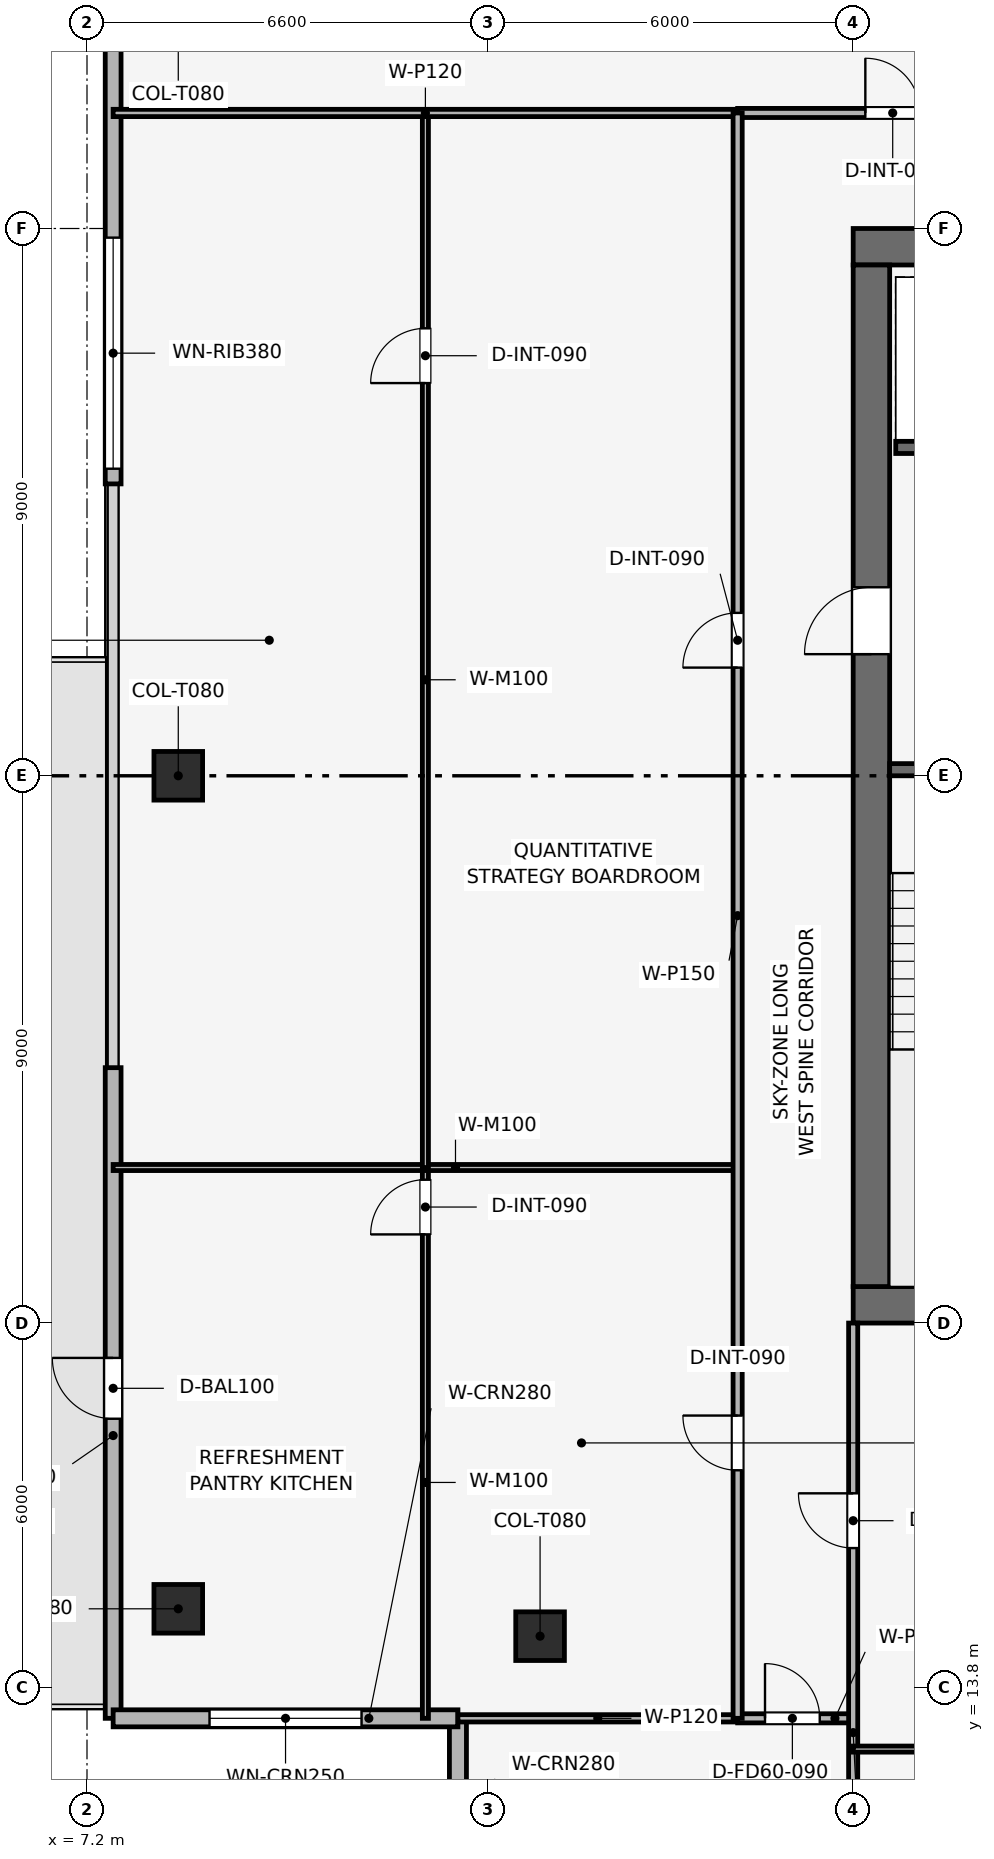
"""IFC4 building model, lengths in metres.
Left out: names, types, materials, properties, quantities, classifications, styles, units other than length and angle.
Written with IfcOpenShell. Run it as: python <this file> out.ifc"""

import sys

from ifc_helpers import new_model, si_unit, direction, frame, frame_2d, origin, origin_2d, place, context, subcontext, project, spatial, rectangle, extrude, element, fill, save


model = new_model("IFC4")
c1 = context("Model", 3, precision=1e-05, world=origin(), true_north=direction((0.0, 1.0)))
c2 = subcontext(c1, "Body", "Model", "MODEL_VIEW")
j1 = project(units=[si_unit("LENGTHUNIT", "METRE"), si_unit("PLANEANGLEUNIT", "RADIAN")], contexts=[c1])
p1 = place(None, origin())
s1 = spatial("IfcSite", under=j1, at=p1, CompositionType="ELEMENT")
p2 = place(p1, origin())
s2 = spatial("IfcBuilding", under=s1, at=p2, CompositionType="ELEMENT")
p3 = place(p2, frame((0.0, 0.0, 351.75)))
s3 = spatial("IfcBuildingStorey", under=s2, at=p3, CompositionType="ELEMENT", Elevation=351.75)
p4 = place(p3, frame((19.8, 20.1, 0.0), z_axis=(0.0, 0.0, 1.0), x_axis=(1.0, 0.0, 0.0)))
e1 = element("IfcWall", 1, at=p4, inside=s3, PredefinedType="SHEAR", context=c2, shape_type="SweptSolid", body=[
    extrude(rectangle(XDim=18.0, YDim=0.6, at=frame_2d((9.0, 0.0))), origin(), (0.0, 0.0, 1.0), 3.75),
])
p5 = place(p3, frame((19.8, 37.5, 0.0), z_axis=(0.0, 0.0, 1.0), x_axis=(1.0, 0.0, 0.0)))
e2 = element("IfcWall", 2, at=p5, inside=s3, PredefinedType="SHEAR", context=c2, shape_type="SweptSolid", body=[
    extrude(rectangle(XDim=18.0, YDim=0.6, at=frame_2d((9.0, 0.0))), origin(), (0.0, 0.0, 1.0), 3.75),
])
p6 = place(p5, frame((7.05, 0.0, 0.0)))
e3 = element("IfcOpeningElement", 3, at=p6, cuts=e2, PredefinedType="OPENING", context=c2, shape_type="SweptSolid", body=[
    extrude(rectangle(XDim=1.1, YDim=2.15, at=frame_2d((0.55, 1.075))), frame((0.0, 0.31, 0.0), z_axis=(0.0, -1.0, 0.0), x_axis=(1.0, 0.0, 0.0)), (0.0, 0.0, 1.0), 0.62),
])
p7 = place(p3, frame((20.1, 20.4, 0.0), z_axis=(0.0, 0.0, 1.0), x_axis=(0.0, 1.0, 0.0)))
e4 = element("IfcWall", 4, at=p7, inside=s3, PredefinedType="SHEAR", context=c2, shape_type="SweptSolid", body=[
    extrude(rectangle(XDim=16.8, YDim=0.6, at=frame_2d((8.4, 0.0))), origin(), (0.0, 0.0, 1.0), 3.75),
])
p8 = place(p7, frame((10.4, 0.0, 0.0)))
e5 = element("IfcOpeningElement", 5, at=p8, cuts=e4, PredefinedType="OPENING", context=c2, shape_type="SweptSolid", body=[
    extrude(rectangle(XDim=1.1, YDim=2.15, at=frame_2d((0.55, 1.075))), frame((0.0, 0.31, 0.0), z_axis=(0.0, -1.0, 0.0), x_axis=(1.0, 0.0, 0.0)), (0.0, 0.0, 1.0), 0.62),
])
p9 = place(p3, frame((8.701, 28.8, 0.003), z_axis=(0.233370375419, 0.0, 0.97238792047), x_axis=(0.0, 1.0, 0.0)))
e6 = element("IfcColumn", 6, at=p9, inside=s3, PredefinedType="COLUMN", context=c2, shape_type="SweptSolid", body=[
    extrude(rectangle(XDim=0.8, YDim=0.8, at=origin_2d()), origin(), (0.0, 0.0, 1.0), 3.583),
])
p10 = place(p3, frame((8.701, 15.101, 0.003), z_axis=(0.229623714174, 0.178469584564, 0.956776649629), x_axis=(-0.613669261878, 0.789563193814, 0.0)))
e7 = element("IfcColumn", 7, at=p10, inside=s3, PredefinedType="COLUMN", context=c2, shape_type="SweptSolid", body=[
    extrude(rectangle(XDim=0.8, YDim=0.8, at=origin_2d()), origin(), (0.0, 0.0, 1.0), 3.642),
])
p11 = place(p3, frame((14.651, 14.651, 0.003), z_axis=(0.180425446151, 0.180425446151, 0.966898814128), x_axis=(-0.707106781187, 0.707106781187, 0.0)))
e8 = element("IfcColumn", 8, at=p11, inside=s3, PredefinedType="COLUMN", context=c2, shape_type="SweptSolid", body=[
    extrude(rectangle(XDim=0.8, YDim=0.8, at=origin_2d()), origin(), (0.0, 0.0, 1.0), 3.604),
])
p12 = place(p3, frame((7.63, 13.3, 0.0), z_axis=(0.0, 0.0, 1.0), x_axis=(0.0, 1.0, 0.0)))
e9 = element("IfcWall", 9, at=p12, inside=s3, PredefinedType="SOLIDWALL", context=c2, shape_type="SweptSolid", body=[
    extrude(rectangle(XDim=10.7, YDim=0.26, at=frame_2d((5.35, 0.0))), origin(), (0.0, 0.0, 1.0), 3.49),
])
p13 = place(p12, frame((4.927, 0.0, 0.0)))
e10 = element("IfcOpeningElement", 10, at=p13, cuts=e9, PredefinedType="OPENING", context=c2, shape_type="SweptSolid", body=[
    extrude(rectangle(XDim=1.0, YDim=2.2, at=frame_2d((0.5, 1.1))), frame((0.0, 0.14, 0.0), z_axis=(0.0, -1.0, 0.0), x_axis=(1.0, 0.0, 0.0)), (0.0, 0.0, 1.0), 0.28),
])
p14 = place(p3, frame((7.63, 33.6, 0.0), z_axis=(0.0, 0.0, 1.0), x_axis=(0.0, 1.0, 0.0)))
e11 = element("IfcWall", 11, at=p14, inside=s3, PredefinedType="SOLIDWALL", context=c2, shape_type="SweptSolid", body=[
    extrude(rectangle(XDim=10.7, YDim=0.26, at=frame_2d((5.35, 0.0))), origin(), (0.0, 0.0, 1.0), 3.49),
])
p15 = place(p14, frame((0.25, 0.0, 0.9)))
e12 = element("IfcOpeningElement", 12, at=p15, cuts=e11, PredefinedType="OPENING", context=c2, shape_type="SweptSolid", body=[
    extrude(rectangle(XDim=3.8, YDim=1.9, at=frame_2d((1.9, 0.95))), frame((0.0, 0.14, 0.0), z_axis=(0.0, -1.0, 0.0), x_axis=(1.0, 0.0, 0.0)), (0.0, 0.0, 1.0), 0.28),
])
p16 = place(p3, frame((13.3, 7.63, 0.0), z_axis=(0.0, 0.0, 1.0), x_axis=(0.0, 1.0, 0.0)))
e13 = element("IfcWall", 13, at=p16, inside=s3, PredefinedType="SOLIDWALL", context=c2, shape_type="SweptSolid", body=[
    extrude(rectangle(XDim=5.67, YDim=0.28, at=frame_2d((2.835, 0.0))), origin(), (0.0, 0.0, 1.0), 3.49),
])
p17 = place(p16, frame((1.585, 0.0, 0.9)))
e14 = element("IfcOpeningElement", 14, at=p17, cuts=e13, PredefinedType="OPENING", context=c2, shape_type="SweptSolid", body=[
    extrude(rectangle(XDim=2.5, YDim=1.9, at=frame_2d((1.25, 0.95))), frame((0.0, 0.15, 0.0), z_axis=(0.0, -1.0, 0.0), x_axis=(1.0, 0.0, 0.0)), (0.0, 0.0, 1.0), 0.3),
])
p18 = place(p3, frame((13.3, 13.3, 0.0), z_axis=(0.0, 0.0, 1.0), x_axis=(-1.0, 0.0, 0.0)))
e15 = element("IfcWall", 15, at=p18, inside=s3, PredefinedType="SOLIDWALL", context=c2, shape_type="SweptSolid", body=[
    extrude(rectangle(XDim=5.67, YDim=0.28, at=frame_2d((2.835, 0.0))), origin(), (0.0, 0.0, 1.0), 3.49),
])
p19 = place(p18, frame((1.585, 0.0, 0.9)))
e16 = element("IfcOpeningElement", 16, at=p19, cuts=e15, PredefinedType="OPENING", context=c2, shape_type="SweptSolid", body=[
    extrude(rectangle(XDim=2.5, YDim=1.9, at=frame_2d((1.25, 0.95))), frame((0.0, 0.15, 0.0), z_axis=(0.0, -1.0, 0.0), x_axis=(1.0, 0.0, 0.0)), (0.0, 0.0, 1.0), 0.3),
])
p20 = place(p3, frame((20.4, 28.9, 0.0), z_axis=(0.0, 0.0, 1.0), x_axis=(1.0, 0.0, 0.0)))
e17 = element("IfcWall", 17, at=p20, inside=s3, PredefinedType="SHEAR", context=c2, shape_type="SweptSolid", body=[
    extrude(rectangle(XDim=3.15, YDim=0.2, at=frame_2d((1.575, 0.0))), origin(), (0.0, 0.0, 1.0), 3.49),
])
p21 = place(p20, frame((0.8, 0.0, 0.0)))
e18 = element("IfcOpeningElement", 18, at=p21, cuts=e17, PredefinedType="OPENING", context=c2, shape_type="SweptSolid", body=[
    extrude(rectangle(XDim=1.0, YDim=2.1, at=frame_2d((0.5, 1.05))), frame((0.0, 0.11, 0.0), z_axis=(0.0, -1.0, 0.0), x_axis=(1.0, 0.0, 0.0)), (0.0, 0.0, 1.0), 0.22),
])
p22 = place(p3, frame((20.5, 34.2, 0.0), z_axis=(0.0, 0.0, 1.0), x_axis=(1.0, 0.0, 0.0)))
e19 = element("IfcWall", 19, at=p22, inside=s3, PredefinedType="SHEAR", context=c2, shape_type="SweptSolid", body=[
    extrude(rectangle(XDim=3.05, YDim=0.2, at=frame_2d((1.525, 0.0))), origin(), (0.0, 0.0, 1.0), 3.49),
])
p23 = place(p22, frame((0.75, 0.0, 0.0)))
e20 = element("IfcOpeningElement", 20, at=p23, cuts=e19, PredefinedType="OPENING", context=c2, shape_type="SweptSolid", body=[
    extrude(rectangle(XDim=1.1, YDim=2.15, at=frame_2d((0.55, 1.075))), frame((0.0, 0.11, 0.0), z_axis=(0.0, -1.0, 0.0), x_axis=(1.0, 0.0, 0.0)), (0.0, 0.0, 1.0), 0.22),
])
p24 = place(p3, frame((12.765, 13.3, 0.0), z_axis=(0.0, 0.0, 1.0), x_axis=(0.0, 1.0, 0.0)))
e21 = element("IfcWall", 21, at=p24, inside=s3, PredefinedType="MOVABLE", context=c2, shape_type="SweptSolid", body=[
    extrude(rectangle(XDim=9.058, YDim=0.1, at=frame_2d((4.529, 0.0))), origin(), (0.0, 0.0, 1.0), 3.075),
])
p25 = place(p24, frame((7.958, 0.0, 0.0)))
e22 = element("IfcOpeningElement", 22, at=p25, cuts=e21, PredefinedType="OPENING", context=c2, shape_type="SweptSolid", body=[
    extrude(rectangle(XDim=0.9, YDim=2.1, at=frame_2d((0.45, 1.05))), frame((0.0, 0.06, 0.0), z_axis=(0.0, -1.0, 0.0), x_axis=(1.0, 0.0, 0.0)), (0.0, 0.0, 1.0), 0.12),
])
p26 = place(p3, frame((7.63, 22.358, 0.0), z_axis=(0.0, 0.0, 1.0), x_axis=(1.0, 0.0, 0.0)))
e23 = element("IfcWall", 23, at=p26, inside=s3, PredefinedType="MOVABLE", context=c2, shape_type="SweptSolid", body=[
    extrude(rectangle(XDim=10.27, YDim=0.1, at=frame_2d((5.135, 0.0))), origin(), (0.0, 0.0, 1.0), 3.115),
])
p27 = place(p3, frame((12.765, 22.358, 0.0), z_axis=(0.0, 0.0, 1.0), x_axis=(0.0, 1.0, 0.0)))
e24 = element("IfcWall", 24, at=p27, inside=s3, PredefinedType="MOVABLE", context=c2, shape_type="SweptSolid", body=[
    extrude(rectangle(XDim=17.342, YDim=0.1, at=frame_2d((8.671, 0.0))), origin(), (0.0, 0.0, 1.0), 3.075),
])
p28 = place(p27, frame((12.9, 0.0, 0.0)))
e25 = element("IfcOpeningElement", 25, at=p28, cuts=e24, PredefinedType="OPENING", context=c2, shape_type="SweptSolid", body=[
    extrude(rectangle(XDim=0.9, YDim=2.1, at=frame_2d((0.45, 1.05))), frame((0.0, 0.06, 0.0), z_axis=(0.0, -1.0, 0.0), x_axis=(1.0, 0.0, 0.0)), (0.0, 0.0, 1.0), 0.12),
])
p29 = place(p3, frame((13.3, 13.3, 0.0), z_axis=(0.0, 0.0, 1.0), x_axis=(1.0, 0.0, 0.0)))
e26 = element("IfcWall", 26, at=p29, inside=s3, PredefinedType="PARTITIONING", context=c2, shape_type="SweptSolid", body=[
    extrude(rectangle(XDim=4.6, YDim=0.12, at=frame_2d((2.3, 0.0))), origin(), (0.0, 0.0, 1.0), 3.175),
])
p30 = place(p3, frame((17.9, 13.3, 0.0), z_axis=(0.0, 0.0, 1.0), x_axis=(1.0, 0.0, 0.0)))
e27 = element("IfcWall", 27, at=p30, inside=s3, PredefinedType="PARTITIONING", context=c2, shape_type="SweptSolid", body=[
    extrude(rectangle(XDim=1.9, YDim=0.15, at=frame_2d((0.95, 0.0))), origin(), (0.0, 0.0, 1.0), 3.49),
])
p31 = place(p30, frame((0.45, 0.0, 0.0)))
e28 = element("IfcOpeningElement", 28, at=p31, cuts=e27, PredefinedType="OPENING", context=c2, shape_type="SweptSolid", body=[
    extrude(rectangle(XDim=0.9, YDim=2.1, at=frame_2d((0.45, 1.05))), frame((0.0, 0.085, 0.0), z_axis=(0.0, -1.0, 0.0), x_axis=(1.0, 0.0, 0.0)), (0.0, 0.0, 1.0), 0.17),
])
p32 = place(p3, frame((19.8, 7.63, 0.0), z_axis=(0.0, 0.0, 1.0), x_axis=(0.0, 1.0, 0.0)))
e29 = element("IfcWall", 29, at=p32, inside=s3, PredefinedType="PARTITIONING", context=c2, shape_type="SweptSolid", body=[
    extrude(rectangle(XDim=12.17, YDim=0.15, at=frame_2d((6.085, 0.0))), origin(), (0.0, 0.0, 1.0), 3.075),
])
p33 = place(p32, frame((8.47, 0.0, 0.0)))
e30 = element("IfcOpeningElement", 30, at=p33, cuts=e29, PredefinedType="OPENING", context=c2, shape_type="SweptSolid", body=[
    extrude(rectangle(XDim=0.9, YDim=2.1, at=frame_2d((0.45, 1.05))), frame((0.0, 0.085, 0.0), z_axis=(0.0, -1.0, 0.0), x_axis=(1.0, 0.0, 0.0)), (0.0, 0.0, 1.0), 0.17),
])
p34 = place(p3, frame((19.8, 12.794, 0.0), z_axis=(0.0, 0.0, 1.0), x_axis=(1.0, 0.0, 0.0)))
e31 = element("IfcWall", 31, at=p34, inside=s3, PredefinedType="MOVABLE", context=c2, shape_type="SweptSolid", body=[
    extrude(rectangle(XDim=24.5, YDim=0.1, at=frame_2d((12.25, 0.0))), origin(), (0.0, 0.0, 1.0), 3.075),
])
p35 = place(p34, frame((2.133, 0.0, 0.0)))
e32 = element("IfcOpeningElement", 32, at=p35, cuts=e31, PredefinedType="OPENING", context=c2, shape_type="SweptSolid", body=[
    extrude(rectangle(XDim=0.9, YDim=2.1, at=frame_2d((0.45, 1.05))), frame((0.0, 0.06, 0.0), z_axis=(0.0, -1.0, 0.0), x_axis=(1.0, 0.0, 0.0)), (0.0, 0.0, 1.0), 0.12),
])
p36 = place(p3, frame((7.63, 39.7, 0.0), z_axis=(0.0, 0.0, 1.0), x_axis=(1.0, 0.0, 0.0)))
e33 = element("IfcWall", 33, at=p36, inside=s3, PredefinedType="PARTITIONING", context=c2, shape_type="SweptSolid", body=[
    extrude(rectangle(XDim=10.27, YDim=0.12, at=frame_2d((5.135, 0.0))), origin(), (0.0, 0.0, 1.0), 3.075),
])
p37 = place(p3, frame((17.9, 39.7, 0.0), z_axis=(0.0, 0.0, 1.0), x_axis=(1.0, 0.0, 0.0)))
e34 = element("IfcWall", 34, at=p37, inside=s3, PredefinedType="PARTITIONING", context=c2, shape_type="SweptSolid", body=[
    extrude(rectangle(XDim=21.8, YDim=0.15, at=frame_2d((10.9, 0.0))), origin(), (0.0, 0.0, 1.0), 3.075),
])
p38 = place(p37, frame((2.1, 0.0, 0.0)))
e35 = element("IfcOpeningElement", 35, at=p38, cuts=e34, PredefinedType="OPENING", context=c2, shape_type="SweptSolid", body=[
    extrude(rectangle(XDim=0.9, YDim=2.1, at=frame_2d((0.45, 1.05))), frame((0.0, 0.085, 0.0), z_axis=(0.0, -1.0, 0.0), x_axis=(1.0, 0.0, 0.0)), (0.0, 0.0, 1.0), 0.17),
])
p39 = place(p37, frame((6.05, 0.0, 0.0)))
e36 = element("IfcOpeningElement", 36, at=p39, cuts=e34, PredefinedType="OPENING", context=c2, shape_type="SweptSolid", body=[
    extrude(rectangle(XDim=0.9, YDim=2.1, at=frame_2d((0.45, 1.05))), frame((0.0, 0.085, 0.0), z_axis=(0.0, -1.0, 0.0), x_axis=(1.0, 0.0, 0.0)), (0.0, 0.0, 1.0), 0.17),
])
p40 = place(p37, frame((8.95, 0.0, 0.0)))
e37 = element("IfcOpeningElement", 37, at=p40, cuts=e34, PredefinedType="OPENING", context=c2, shape_type="SweptSolid", body=[
    extrude(rectangle(XDim=0.9, YDim=2.1, at=frame_2d((0.45, 1.05))), frame((0.0, 0.085, 0.0), z_axis=(0.0, -1.0, 0.0), x_axis=(1.0, 0.0, 0.0)), (0.0, 0.0, 1.0), 0.17),
])
p41 = place(p37, frame((11.7, 0.0, 0.0)))
e38 = element("IfcOpeningElement", 38, at=p41, cuts=e34, PredefinedType="OPENING", context=c2, shape_type="SweptSolid", body=[
    extrude(rectangle(XDim=0.95, YDim=2.1, at=frame_2d((0.475, 1.05))), frame((0.0, 0.085, 0.0), z_axis=(0.0, -1.0, 0.0), x_axis=(1.0, 0.0, 0.0)), (0.0, 0.0, 1.0), 0.17),
])
p42 = place(p37, frame((17.2, 0.0, 0.0)))
e39 = element("IfcOpeningElement", 39, at=p42, cuts=e34, PredefinedType="OPENING", context=c2, shape_type="SweptSolid", body=[
    extrude(rectangle(XDim=0.9, YDim=2.1, at=frame_2d((0.45, 1.05))), frame((0.0, 0.085, 0.0), z_axis=(0.0, -1.0, 0.0), x_axis=(1.0, 0.0, 0.0)), (0.0, 0.0, 1.0), 0.17),
])
p43 = place(p3, frame((17.9, 13.3, 0.0), z_axis=(0.0, 0.0, 1.0), x_axis=(0.0, 1.0, 0.0)))
e40 = element("IfcWall", 40, at=p43, inside=s3, PredefinedType="PARTITIONING", context=c2, shape_type="SweptSolid", body=[
    extrude(rectangle(XDim=26.4, YDim=0.15, at=frame_2d((13.2, 0.0))), origin(), (0.0, 0.0, 1.0), 3.075),
])
p44 = place(p43, frame((4.079, 0.0, 0.0)))
e41 = element("IfcOpeningElement", 41, at=p44, cuts=e40, PredefinedType="OPENING", context=c2, shape_type="SweptSolid", body=[
    extrude(rectangle(XDim=0.9, YDim=2.1, at=frame_2d((0.45, 1.05))), frame((0.0, 0.085, 0.0), z_axis=(0.0, -1.0, 0.0), x_axis=(1.0, 0.0, 0.0)), (0.0, 0.0, 1.0), 0.17),
])
p45 = place(p43, frame((17.279, 0.0, 0.0)))
e42 = element("IfcOpeningElement", 42, at=p45, cuts=e40, PredefinedType="OPENING", context=c2, shape_type="SweptSolid", body=[
    extrude(rectangle(XDim=0.9, YDim=2.1, at=frame_2d((0.45, 1.05))), frame((0.0, 0.085, 0.0), z_axis=(0.0, -1.0, 0.0), x_axis=(1.0, 0.0, 0.0)), (0.0, 0.0, 1.0), 0.17),
])
p46 = place(p13, origin())
e43 = element("IfcDoor", 43, at=p46, inside=s3, OperationType="SINGLE_SWING_RIGHT", PredefinedType="DOOR", context=c2, shape_type="SweptSolid", body=[
    extrude(rectangle(XDim=1.0, YDim=2.2, at=frame_2d((0.5, 1.1))), frame((0.0, 0.025, 0.0), z_axis=(0.0, -1.0, 0.0), x_axis=(1.0, 0.0, 0.0)), (0.0, 0.0, 1.0), 0.05),
])
fill(e10, e43)
p47 = place(p15, origin())
e44 = element("IfcWindow", 44, at=p47, inside=s3, PartitioningType="SINGLE_PANEL", PredefinedType="WINDOW", context=c2, shape_type="SweptSolid", body=[
    extrude(rectangle(XDim=3.8, YDim=1.9, at=frame_2d((1.9, 0.95))), frame((0.0, 0.03, 0.0), z_axis=(0.0, -1.0, 0.0), x_axis=(1.0, 0.0, 0.0)), (0.0, 0.0, 1.0), 0.06),
])
fill(e12, e44)
p48 = place(p19, origin())
e45 = element("IfcWindow", 45, at=p48, inside=s3, PartitioningType="SINGLE_PANEL", PredefinedType="WINDOW", context=c2, shape_type="SweptSolid", body=[
    extrude(rectangle(XDim=2.5, YDim=1.9, at=frame_2d((1.25, 0.95))), frame((0.0, 0.03, 0.0), z_axis=(0.0, -1.0, 0.0), x_axis=(1.0, 0.0, 0.0)), (0.0, 0.0, 1.0), 0.06),
])
fill(e16, e45)
p49 = place(p25, origin())
e46 = element("IfcDoor", 46, at=p49, inside=s3, OperationType="SINGLE_SWING_LEFT", PredefinedType="DOOR", context=c2, shape_type="SweptSolid", body=[
    extrude(rectangle(XDim=0.9, YDim=2.1, at=frame_2d((0.45, 1.05))), frame((0.0, 0.025, 0.0), z_axis=(0.0, -1.0, 0.0), x_axis=(1.0, 0.0, 0.0)), (0.0, 0.0, 1.0), 0.05),
])
fill(e22, e46)
p50 = place(p28, origin())
e47 = element("IfcDoor", 47, at=p50, inside=s3, OperationType="SINGLE_SWING_LEFT", PredefinedType="DOOR", context=c2, shape_type="SweptSolid", body=[
    extrude(rectangle(XDim=0.9, YDim=2.1, at=frame_2d((0.45, 1.05))), frame((0.0, 0.025, 0.0), z_axis=(0.0, -1.0, 0.0), x_axis=(1.0, 0.0, 0.0)), (0.0, 0.0, 1.0), 0.05),
])
fill(e25, e47)
p51 = place(p31, origin())
e48 = element("IfcDoor", 48, at=p51, inside=s3, OperationType="SINGLE_SWING_LEFT", PredefinedType="DOOR", context=c2, shape_type="SweptSolid", body=[
    extrude(rectangle(XDim=0.9, YDim=2.1, at=frame_2d((0.45, 1.05))), frame((0.0, 0.025, 0.0), z_axis=(0.0, -1.0, 0.0), x_axis=(1.0, 0.0, 0.0)), (0.0, 0.0, 1.0), 0.05),
])
fill(e28, e48)
p52 = place(p33, origin())
e49 = element("IfcDoor", 49, at=p52, inside=s3, OperationType="SINGLE_SWING_RIGHT", PredefinedType="DOOR", context=c2, shape_type="SweptSolid", body=[
    extrude(rectangle(XDim=0.9, YDim=2.1, at=frame_2d((0.45, 1.05))), frame((0.0, 0.025, 0.0), z_axis=(0.0, -1.0, 0.0), x_axis=(1.0, 0.0, 0.0)), (0.0, 0.0, 1.0), 0.05),
])
fill(e30, e49)
p53 = place(p38, origin())
e50 = element("IfcDoor", 50, at=p53, inside=s3, OperationType="SINGLE_SWING_LEFT", PredefinedType="DOOR", context=c2, shape_type="SweptSolid", body=[
    extrude(rectangle(XDim=0.9, YDim=2.1, at=frame_2d((0.45, 1.05))), frame((0.0, 0.025, 0.0), z_axis=(0.0, -1.0, 0.0), x_axis=(1.0, 0.0, 0.0)), (0.0, 0.0, 1.0), 0.05),
])
fill(e35, e50)
p54 = place(p44, origin())
e51 = element("IfcDoor", 51, at=p54, inside=s3, OperationType="SINGLE_SWING_RIGHT", PredefinedType="DOOR", context=c2, shape_type="SweptSolid", body=[
    extrude(rectangle(XDim=0.9, YDim=2.1, at=frame_2d((0.45, 1.05))), frame((0.0, 0.025, 0.0), z_axis=(0.0, -1.0, 0.0), x_axis=(1.0, 0.0, 0.0)), (0.0, 0.0, 1.0), 0.05),
])
fill(e41, e51)
p55 = place(p45, origin())
e52 = element("IfcDoor", 52, at=p55, inside=s3, OperationType="SINGLE_SWING_LEFT", PredefinedType="DOOR", context=c2, shape_type="SweptSolid", body=[
    extrude(rectangle(XDim=0.9, YDim=2.1, at=frame_2d((0.45, 1.05))), frame((0.0, 0.025, 0.0), z_axis=(0.0, -1.0, 0.0), x_axis=(1.0, 0.0, 0.0)), (0.0, 0.0, 1.0), 0.05),
])
fill(e42, e52)
p56 = place(p8, origin())
e53 = element("IfcDoor", 53, at=p56, inside=s3, OperationType="SINGLE_SWING_LEFT", PredefinedType="DOOR", context=c2, shape_type="SweptSolid", body=[
    extrude(rectangle(XDim=1.1, YDim=2.15, at=frame_2d((0.55, 1.075))), frame((0.0, 0.025, 0.0), z_axis=(0.0, -1.0, 0.0), x_axis=(1.0, 0.0, 0.0)), (0.0, 0.0, 1.0), 0.05),
])
fill(e5, e53)
save(model, sys.argv[1])
